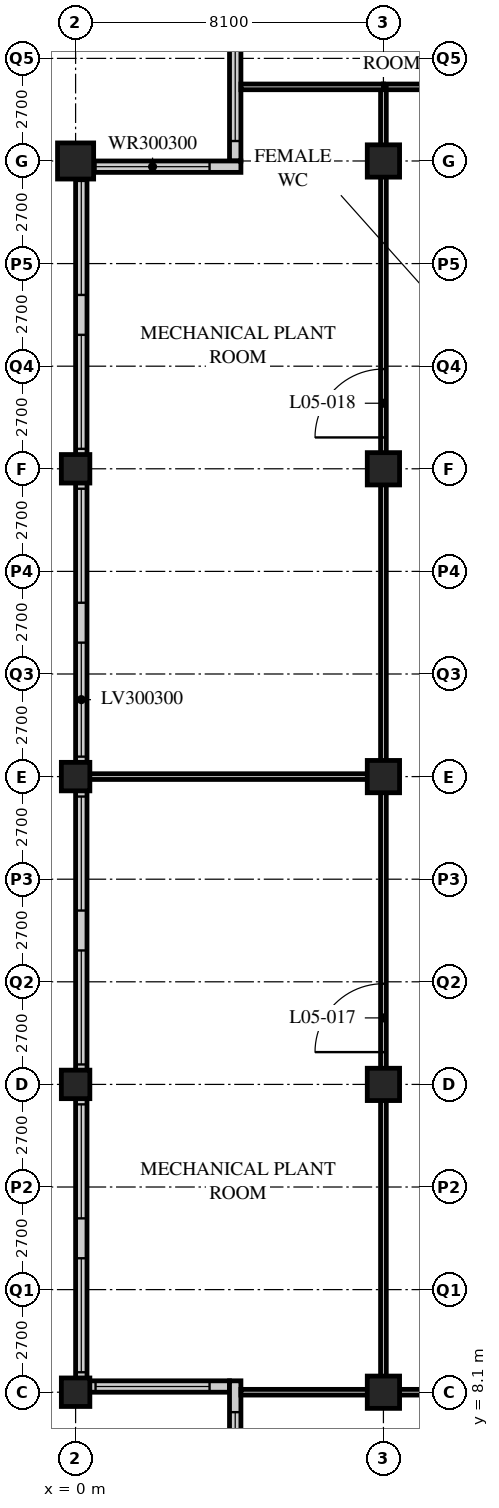
"""IFC4 building model, lengths in metres.
Left out: names, types, materials, properties, quantities, classifications, styles, units other than length and angle.
Written with IfcOpenShell. Run it as: python <this file> out.ifc"""

import sys

from ifc_helpers import new_model, si_unit, direction, frame, frame_2d, origin, origin_2d, place, context, subcontext, project, spatial, rectangle, hollow_rectangle, extrude, element, fill, save


model = new_model("IFC4")
c1 = context("Model", 3, precision=1e-05, world=origin(), true_north=direction((0.0, 1.0)))
c2 = subcontext(c1, "Body", "Model", "MODEL_VIEW")
j1 = project(units=[si_unit("LENGTHUNIT", "METRE"), si_unit("PLANEANGLEUNIT", "RADIAN")], contexts=[c1])
p1 = place(None, origin())
s1 = spatial("IfcSite", under=j1, at=p1, CompositionType="ELEMENT")
p2 = place(p1, origin())
s2 = spatial("IfcBuilding", under=s1, at=p2, CompositionType="ELEMENT")
p3 = place(p2, frame((0.0, 0.0, 27.6)))
s3 = spatial("IfcBuildingStorey", under=s2, at=p3, CompositionType="ELEMENT", Elevation=27.6)
for number, where, z_axis, x_axis in (
    (1, (0.0, 8.1, 0.0), (0.0, 0.0, 1.0), (1.0, 0.0, 0.0)),
    (2, (0.0, 16.2, 0.0), (0.0, 0.0, 1.0), (1.0, 0.0, 0.0)),
    (3, (0.0, 24.3, 0.0), (0.0, 0.0, 1.0), (1.0, 0.0, 0.0)),
    (4, (0.0, 32.4, 0.0), (0.0, 0.0, 1.0), (1.0, 0.0, 0.0)),
):
    element("IfcColumn", number, at=place(p3, frame(where, z_axis=z_axis, x_axis=x_axis)), inside=s3, PredefinedType="COLUMN", context=c2, shape_type="SweptSolid", body=[
        extrude(hollow_rectangle(XDim=0.75, YDim=0.75, WallThickness=0.07, at=origin_2d()), origin(), (0.0, 0.0, 1.0), 5.4),
    ])
p4 = place(p3, frame((0.0, 40.5, 0.0), z_axis=(0.0, 0.0, 1.0), x_axis=(1.0, 0.0, 0.0)))
e5 = element("IfcColumn", 5, at=p4, inside=s3, PredefinedType="COLUMN", context=c2, shape_type="SweptSolid", body=[
    extrude(hollow_rectangle(XDim=0.95, YDim=0.95, WallThickness=0.1, at=origin_2d()), origin(), (0.0, 0.0, 1.0), 5.4),
])
for number, where, z_axis, x_axis in (
    (6, (8.1, 8.1, 0.0), (0.0, 0.0, 1.0), (1.0, 0.0, 0.0)),
    (7, (8.1, 16.2, 0.0), (0.0, 0.0, 1.0), (1.0, 0.0, 0.0)),
    (8, (8.1, 24.3, 0.0), (0.0, 0.0, 1.0), (1.0, 0.0, 0.0)),
    (9, (8.1, 32.4, 0.0), (0.0, 0.0, 1.0), (1.0, 0.0, 0.0)),
    (10, (8.1, 40.5, 0.0), (0.0, 0.0, 1.0), (1.0, 0.0, 0.0)),
):
    element("IfcColumn", number, at=place(p3, frame(where, z_axis=z_axis, x_axis=x_axis)), inside=s3, PredefinedType="COLUMN", context=c2, shape_type="SweptSolid", body=[
        extrude(hollow_rectangle(XDim=0.85, YDim=0.85, WallThickness=0.085, at=origin_2d()), origin(), (0.0, 0.0, 1.0), 5.4),
    ])
p5 = place(p3, frame((4.2, 44.25, 0.0), z_axis=(0.0, 0.0, 1.0), x_axis=(0.0, -1.0, 0.0)))
e11 = element("IfcWall", 11, at=p5, inside=s3, PredefinedType="SOLIDWALL", context=c2, shape_type="SweptSolid", body=[
    extrude(rectangle(XDim=3.75, YDim=0.3, at=frame_2d((1.875, 0.0))), origin(), (0.0, 0.0, 1.0), 5.19),
])
p6 = place(p5, frame((0.225, 0.0, 0.9)))
e12 = element("IfcOpeningElement", 12, at=p6, cuts=e11, PredefinedType="OPENING", context=c2, shape_type="SweptSolid", body=[
    extrude(rectangle(XDim=3.0, YDim=3.0, at=frame_2d((1.5, 1.5))), frame((0.0, 0.16, 0.0), z_axis=(0.0, -1.0, 0.0), x_axis=(1.0, 0.0, 0.0)), (0.0, 0.0, 1.0), 0.32),
])
p7 = place(p3, frame((4.35, 40.35, 0.0), z_axis=(0.0, 0.0, 1.0), x_axis=(-1.0, 0.0, 0.0)))
e13 = element("IfcWall", 13, at=p7, inside=s3, PredefinedType="SOLIDWALL", context=c2, shape_type="SweptSolid", body=[
    extrude(rectangle(XDim=4.35, YDim=0.3, at=frame_2d((2.175, 0.0))), origin(), (0.0, 0.0, 1.0), 5.19),
])
p8 = place(p7, frame((0.825, 0.0, 0.9)))
e14 = element("IfcOpeningElement", 14, at=p8, cuts=e13, PredefinedType="OPENING", context=c2, shape_type="SweptSolid", body=[
    extrude(rectangle(XDim=3.0, YDim=3.0, at=frame_2d((1.5, 1.5))), frame((0.0, 0.16, 0.0), z_axis=(0.0, -1.0, 0.0), x_axis=(1.0, 0.0, 0.0)), (0.0, 0.0, 1.0), 0.32),
])
p9 = place(p3, frame((0.15, 40.2, 0.0), z_axis=(0.0, 0.0, 1.0), x_axis=(0.0, -1.0, 0.0)))
e15 = element("IfcWall", 15, at=p9, inside=s3, PredefinedType="SOLIDWALL", context=c2, shape_type="SweptSolid", body=[
    extrude(rectangle(XDim=32.1, YDim=0.3, at=frame_2d((16.05, 0.0))), origin(), (0.0, 0.0, 1.0), 5.19),
])
p10 = place(p9, frame((0.225, 0.0, 0.9)))
e16 = element("IfcOpeningElement", 16, at=p10, cuts=e15, PredefinedType="OPENING", context=c2, shape_type="SweptSolid", body=[
    extrude(rectangle(XDim=3.0, YDim=3.0, at=frame_2d((1.5, 1.5))), frame((0.0, 0.16, 0.0), z_axis=(0.0, -1.0, 0.0), x_axis=(1.0, 0.0, 0.0)), (0.0, 0.0, 1.0), 0.32),
])
p11 = place(p9, frame((4.275, 0.0, 0.9)))
e17 = element("IfcOpeningElement", 17, at=p11, cuts=e15, PredefinedType="OPENING", context=c2, shape_type="SweptSolid", body=[
    extrude(rectangle(XDim=3.0, YDim=3.0, at=frame_2d((1.5, 1.5))), frame((0.0, 0.16, 0.0), z_axis=(0.0, -1.0, 0.0), x_axis=(1.0, 0.0, 0.0)), (0.0, 0.0, 1.0), 0.32),
])
p12 = place(p9, frame((8.325, 0.0, 0.9)))
e18 = element("IfcOpeningElement", 18, at=p12, cuts=e15, PredefinedType="OPENING", context=c2, shape_type="SweptSolid", body=[
    extrude(rectangle(XDim=3.0, YDim=3.0, at=frame_2d((1.5, 1.5))), frame((0.0, 0.16, 0.0), z_axis=(0.0, -1.0, 0.0), x_axis=(1.0, 0.0, 0.0)), (0.0, 0.0, 1.0), 0.32),
])
p13 = place(p9, frame((12.375, 0.0, 0.9)))
e19 = element("IfcOpeningElement", 19, at=p13, cuts=e15, PredefinedType="OPENING", context=c2, shape_type="SweptSolid", body=[
    extrude(rectangle(XDim=3.0, YDim=3.0, at=frame_2d((1.5, 1.5))), frame((0.0, 0.16, 0.0), z_axis=(0.0, -1.0, 0.0), x_axis=(1.0, 0.0, 0.0)), (0.0, 0.0, 1.0), 0.32),
])
p14 = place(p9, frame((16.425, 0.0, 0.9)))
e20 = element("IfcOpeningElement", 20, at=p14, cuts=e15, PredefinedType="OPENING", context=c2, shape_type="SweptSolid", body=[
    extrude(rectangle(XDim=3.0, YDim=3.0, at=frame_2d((1.5, 1.5))), frame((0.0, 0.16, 0.0), z_axis=(0.0, -1.0, 0.0), x_axis=(1.0, 0.0, 0.0)), (0.0, 0.0, 1.0), 0.32),
])
p15 = place(p9, frame((20.475, 0.0, 0.9)))
e21 = element("IfcOpeningElement", 21, at=p15, cuts=e15, PredefinedType="OPENING", context=c2, shape_type="SweptSolid", body=[
    extrude(rectangle(XDim=3.0, YDim=3.0, at=frame_2d((1.5, 1.5))), frame((0.0, 0.16, 0.0), z_axis=(0.0, -1.0, 0.0), x_axis=(1.0, 0.0, 0.0)), (0.0, 0.0, 1.0), 0.32),
])
p16 = place(p9, frame((24.525, 0.0, 0.9)))
e22 = element("IfcOpeningElement", 22, at=p16, cuts=e15, PredefinedType="OPENING", context=c2, shape_type="SweptSolid", body=[
    extrude(rectangle(XDim=3.0, YDim=3.0, at=frame_2d((1.5, 1.5))), frame((0.0, 0.16, 0.0), z_axis=(0.0, -1.0, 0.0), x_axis=(1.0, 0.0, 0.0)), (0.0, 0.0, 1.0), 0.32),
])
p17 = place(p9, frame((28.575, 0.0, 0.9)))
e23 = element("IfcOpeningElement", 23, at=p17, cuts=e15, PredefinedType="OPENING", context=c2, shape_type="SweptSolid", body=[
    extrude(rectangle(XDim=3.0, YDim=3.0, at=frame_2d((1.5, 1.5))), frame((0.0, 0.16, 0.0), z_axis=(0.0, -1.0, 0.0), x_axis=(1.0, 0.0, 0.0)), (0.0, 0.0, 1.0), 0.32),
])
p18 = place(p3, frame((0.3, 8.25, 0.0), z_axis=(0.0, 0.0, 1.0), x_axis=(1.0, 0.0, 0.0)))
e24 = element("IfcWall", 24, at=p18, inside=s3, PredefinedType="SOLIDWALL", context=c2, shape_type="SweptSolid", body=[
    extrude(rectangle(XDim=3.75, YDim=0.3, at=frame_2d((1.875, 0.0))), origin(), (0.0, 0.0, 1.0), 5.19),
])
p19 = place(p18, frame((0.225, 0.0, 0.9)))
e25 = element("IfcOpeningElement", 25, at=p19, cuts=e24, PredefinedType="OPENING", context=c2, shape_type="SweptSolid", body=[
    extrude(rectangle(XDim=3.0, YDim=3.0, at=frame_2d((1.5, 1.5))), frame((0.0, 0.16, 0.0), z_axis=(0.0, -1.0, 0.0), x_axis=(1.0, 0.0, 0.0)), (0.0, 0.0, 1.0), 0.32),
])
p20 = place(p3, frame((4.2, 8.4, 0.0), z_axis=(0.0, 0.0, 1.0), x_axis=(0.0, -1.0, 0.0)))
e26 = element("IfcWall", 26, at=p20, inside=s3, PredefinedType="SOLIDWALL", context=c2, shape_type="SweptSolid", body=[
    extrude(rectangle(XDim=4.35, YDim=0.3, at=frame_2d((2.175, 0.0))), origin(), (0.0, 0.0, 1.0), 5.19),
])
p21 = place(p20, frame((0.825, 0.0, 0.9)))
e27 = element("IfcOpeningElement", 27, at=p21, cuts=e26, PredefinedType="OPENING", context=c2, shape_type="SweptSolid", body=[
    extrude(rectangle(XDim=3.0, YDim=3.0, at=frame_2d((1.5, 1.5))), frame((0.0, 0.16, 0.0), z_axis=(0.0, -1.0, 0.0), x_axis=(1.0, 0.0, 0.0)), (0.0, 0.0, 1.0), 0.32),
])
p22 = place(p3, frame((8.1, 8.1, 0.0), z_axis=(0.0, 0.0, 1.0), x_axis=(1.0, 0.0, 0.0)))
e28 = element("IfcWall", 28, at=p22, inside=s3, PredefinedType="PARTITIONING", context=c2, shape_type="SweptSolid", body=[
    extrude(rectangle(XDim=40.5, YDim=0.15, at=frame_2d((20.25, 0.0))), origin(), (0.0, 0.0, 1.0), 4.578),
])
p23 = place(p22, frame((11.25, 0.0, 0.0)))
e29 = element("IfcOpeningElement", 29, at=p23, cuts=e28, PredefinedType="OPENING", context=c2, shape_type="SweptSolid", body=[
    extrude(rectangle(XDim=1.8, YDim=2.4, at=frame_2d((0.9, 1.2))), frame((0.0, 0.085, 0.0), z_axis=(0.0, -1.0, 0.0), x_axis=(1.0, 0.0, 0.0)), (0.0, 0.0, 1.0), 0.17),
])
p24 = place(p22, frame((27.45, 0.0, 0.0)))
e30 = element("IfcOpeningElement", 30, at=p24, cuts=e28, PredefinedType="OPENING", context=c2, shape_type="SweptSolid", body=[
    extrude(rectangle(XDim=1.8, YDim=2.4, at=frame_2d((0.9, 1.2))), frame((0.0, 0.085, 0.0), z_axis=(0.0, -1.0, 0.0), x_axis=(1.0, 0.0, 0.0)), (0.0, 0.0, 1.0), 0.17),
])
p25 = place(p22, frame((1.525, 0.0, 0.0)))
e31 = element("IfcOpeningElement", 31, at=p25, cuts=e28, PredefinedType="OPENING", context=c2, shape_type="SweptSolid", body=[
    extrude(rectangle(XDim=1.0, YDim=2.1, at=frame_2d((0.5, 1.05))), frame((0.0, 0.085, 0.0), z_axis=(0.0, -1.0, 0.0), x_axis=(1.0, 0.0, 0.0)), (0.0, 0.0, 1.0), 0.17),
])
p26 = place(p22, frame((37.975, 0.0, 0.0)))
e32 = element("IfcOpeningElement", 32, at=p26, cuts=e28, PredefinedType="OPENING", context=c2, shape_type="SweptSolid", body=[
    extrude(rectangle(XDim=1.0, YDim=2.1, at=frame_2d((0.5, 1.05))), frame((0.0, 0.085, 0.0), z_axis=(0.0, -1.0, 0.0), x_axis=(1.0, 0.0, 0.0)), (0.0, 0.0, 1.0), 0.17),
])
p27 = place(p3, frame((8.1, 42.45, 0.0), z_axis=(0.0, 0.0, 1.0), x_axis=(1.0, 0.0, 0.0)))
e33 = element("IfcWall", 33, at=p27, inside=s3, PredefinedType="PARTITIONING", context=c2, shape_type="SweptSolid", body=[
    extrude(rectangle(XDim=40.5, YDim=0.15, at=frame_2d((20.25, 0.0))), origin(), (0.0, 0.0, 1.0), 5.19),
])
p28 = place(p27, frame((8.2, 0.0, 0.0)))
e34 = element("IfcOpeningElement", 34, at=p28, cuts=e33, PredefinedType="OPENING", context=c2, shape_type="SweptSolid", body=[
    extrude(rectangle(XDim=1.8, YDim=2.4, at=frame_2d((0.9, 1.2))), frame((0.0, 0.085, 0.0), z_axis=(0.0, -1.0, 0.0), x_axis=(1.0, 0.0, 0.0)), (0.0, 0.0, 1.0), 0.17),
])
p29 = place(p27, frame((19.35, 0.0, 0.0)))
e35 = element("IfcOpeningElement", 35, at=p29, cuts=e33, PredefinedType="OPENING", context=c2, shape_type="SweptSolid", body=[
    extrude(rectangle(XDim=1.8, YDim=2.4, at=frame_2d((0.9, 1.2))), frame((0.0, 0.085, 0.0), z_axis=(0.0, -1.0, 0.0), x_axis=(1.0, 0.0, 0.0)), (0.0, 0.0, 1.0), 0.17),
])
p30 = place(p27, frame((32.5, 0.0, 0.0)))
e36 = element("IfcOpeningElement", 36, at=p30, cuts=e33, PredefinedType="OPENING", context=c2, shape_type="SweptSolid", body=[
    extrude(rectangle(XDim=1.8, YDim=2.4, at=frame_2d((0.9, 1.2))), frame((0.0, 0.085, 0.0), z_axis=(0.0, -1.0, 0.0), x_axis=(1.0, 0.0, 0.0)), (0.0, 0.0, 1.0), 0.17),
])
p31 = place(p27, frame((37.975, 0.0, 0.0)))
e37 = element("IfcOpeningElement", 37, at=p31, cuts=e33, PredefinedType="OPENING", context=c2, shape_type="SweptSolid", body=[
    extrude(rectangle(XDim=1.0, YDim=2.1, at=frame_2d((0.5, 1.05))), frame((0.0, 0.085, 0.0), z_axis=(0.0, -1.0, 0.0), x_axis=(1.0, 0.0, 0.0)), (0.0, 0.0, 1.0), 0.17),
])
p32 = place(p27, frame((1.525, 0.0, 0.0)))
e38 = element("IfcOpeningElement", 38, at=p32, cuts=e33, PredefinedType="OPENING", context=c2, shape_type="SweptSolid", body=[
    extrude(rectangle(XDim=1.0, YDim=2.1, at=frame_2d((0.5, 1.05))), frame((0.0, 0.085, 0.0), z_axis=(0.0, -1.0, 0.0), x_axis=(1.0, 0.0, 0.0)), (0.0, 0.0, 1.0), 0.17),
])
p33 = place(p3, frame((8.1, 8.1, 0.0), z_axis=(0.0, 0.0, 1.0), x_axis=(0.0, 1.0, 0.0)))
e39 = element("IfcWall", 39, at=p33, inside=s3, PredefinedType="PARTITIONING", context=c2, shape_type="SweptSolid", body=[
    extrude(rectangle(XDim=34.35, YDim=0.15, at=frame_2d((17.175, 0.0))), origin(), (0.0, 0.0, 1.0), 4.578),
])
p34 = place(p33, frame((8.95, 0.0, 0.0)))
e40 = element("IfcOpeningElement", 40, at=p34, cuts=e39, PredefinedType="OPENING", context=c2, shape_type="SweptSolid", body=[
    extrude(rectangle(XDim=1.8, YDim=2.4, at=frame_2d((0.9, 1.2))), frame((0.0, 0.085, 0.0), z_axis=(0.0, -1.0, 0.0), x_axis=(1.0, 0.0, 0.0)), (0.0, 0.0, 1.0), 0.17),
])
p35 = place(p33, frame((25.125, 0.0, 0.0)))
e41 = element("IfcOpeningElement", 41, at=p35, cuts=e39, PredefinedType="OPENING", context=c2, shape_type="SweptSolid", body=[
    extrude(rectangle(XDim=1.8, YDim=2.4, at=frame_2d((0.9, 1.2))), frame((0.0, 0.085, 0.0), z_axis=(0.0, -1.0, 0.0), x_axis=(1.0, 0.0, 0.0)), (0.0, 0.0, 1.0), 0.17),
])
p36 = place(p3, frame((8.1, 24.3, 0.0), z_axis=(0.0, 0.0, 1.0), x_axis=(-1.0, 0.0, 0.0)))
e42 = element("IfcWall", 42, at=p36, inside=s3, PredefinedType="PARTITIONING", context=c2, shape_type="SweptSolid", body=[
    extrude(rectangle(XDim=7.8, YDim=0.15, at=frame_2d((3.9, 0.0))), origin(), (0.0, 0.0, 1.0), 4.578),
])
p37 = place(p3, frame((4.35, 8.1, 0.0), z_axis=(0.0, 0.0, 1.0), x_axis=(1.0, 0.0, 0.0)))
e43 = element("IfcWall", 43, at=p37, inside=s3, PredefinedType="PARTITIONING", context=c2, shape_type="SweptSolid", body=[
    extrude(rectangle(XDim=3.75, YDim=0.15, at=frame_2d((1.875, 0.0))), origin(), (0.0, 0.0, 1.0), 4.578),
])
p38 = place(p3, frame((4.35, 42.45, 0.0), z_axis=(0.0, 0.0, 1.0), x_axis=(1.0, 0.0, 0.0)))
e44 = element("IfcWall", 44, at=p38, inside=s3, PredefinedType="PARTITIONING", context=c2, shape_type="SweptSolid", body=[
    extrude(rectangle(XDim=3.75, YDim=0.15, at=frame_2d((1.875, 0.0))), origin(), (0.0, 0.0, 1.0), 5.19),
])
p39 = place(p6, origin())
e45 = element("IfcWindow", 45, at=p39, inside=s3, PartitioningType="SINGLE_PANEL", PredefinedType="WINDOW", context=c2, shape_type="SweptSolid", body=[
    extrude(rectangle(XDim=3.0, YDim=3.0, at=frame_2d((1.5, 1.5))), frame((0.0, 0.03, 0.0), z_axis=(0.0, -1.0, 0.0), x_axis=(1.0, 0.0, 0.0)), (0.0, 0.0, 1.0), 0.06),
])
fill(e12, e45)
p40 = place(p8, origin())
e46 = element("IfcWindow", 46, at=p40, inside=s3, PartitioningType="SINGLE_PANEL", PredefinedType="WINDOW", context=c2, shape_type="SweptSolid", body=[
    extrude(rectangle(XDim=3.0, YDim=3.0, at=frame_2d((1.5, 1.5))), frame((0.0, 0.03, 0.0), z_axis=(0.0, -1.0, 0.0), x_axis=(1.0, 0.0, 0.0)), (0.0, 0.0, 1.0), 0.06),
])
fill(e14, e46)
p41 = place(p10, origin())
e47 = element("IfcWindow", 47, at=p41, inside=s3, PartitioningType="SINGLE_PANEL", PredefinedType="USERDEFINED", context=c2, shape_type="SweptSolid", body=[
    extrude(rectangle(XDim=3.0, YDim=3.0, at=frame_2d((1.5, 1.5))), frame((0.0, 0.075, 0.0), z_axis=(0.0, -1.0, 0.0), x_axis=(1.0, 0.0, 0.0)), (0.0, 0.0, 1.0), 0.15),
])
fill(e16, e47)
p42 = place(p11, origin())
e48 = element("IfcWindow", 48, at=p42, inside=s3, PartitioningType="SINGLE_PANEL", PredefinedType="USERDEFINED", context=c2, shape_type="SweptSolid", body=[
    extrude(rectangle(XDim=3.0, YDim=3.0, at=frame_2d((1.5, 1.5))), frame((0.0, 0.075, 0.0), z_axis=(0.0, -1.0, 0.0), x_axis=(1.0, 0.0, 0.0)), (0.0, 0.0, 1.0), 0.15),
])
fill(e17, e48)
p43 = place(p12, origin())
e49 = element("IfcWindow", 49, at=p43, inside=s3, PartitioningType="SINGLE_PANEL", PredefinedType="USERDEFINED", context=c2, shape_type="SweptSolid", body=[
    extrude(rectangle(XDim=3.0, YDim=3.0, at=frame_2d((1.5, 1.5))), frame((0.0, 0.075, 0.0), z_axis=(0.0, -1.0, 0.0), x_axis=(1.0, 0.0, 0.0)), (0.0, 0.0, 1.0), 0.15),
])
fill(e18, e49)
p44 = place(p13, origin())
e50 = element("IfcWindow", 50, at=p44, inside=s3, PartitioningType="SINGLE_PANEL", PredefinedType="USERDEFINED", context=c2, shape_type="SweptSolid", body=[
    extrude(rectangle(XDim=3.0, YDim=3.0, at=frame_2d((1.5, 1.5))), frame((0.0, 0.075, 0.0), z_axis=(0.0, -1.0, 0.0), x_axis=(1.0, 0.0, 0.0)), (0.0, 0.0, 1.0), 0.15),
])
fill(e19, e50)
p45 = place(p14, origin())
e51 = element("IfcWindow", 51, at=p45, inside=s3, PartitioningType="SINGLE_PANEL", PredefinedType="USERDEFINED", context=c2, shape_type="SweptSolid", body=[
    extrude(rectangle(XDim=3.0, YDim=3.0, at=frame_2d((1.5, 1.5))), frame((0.0, 0.075, 0.0), z_axis=(0.0, -1.0, 0.0), x_axis=(1.0, 0.0, 0.0)), (0.0, 0.0, 1.0), 0.15),
])
fill(e20, e51)
p46 = place(p15, origin())
e52 = element("IfcWindow", 52, at=p46, inside=s3, PartitioningType="SINGLE_PANEL", PredefinedType="USERDEFINED", context=c2, shape_type="SweptSolid", body=[
    extrude(rectangle(XDim=3.0, YDim=3.0, at=frame_2d((1.5, 1.5))), frame((0.0, 0.075, 0.0), z_axis=(0.0, -1.0, 0.0), x_axis=(1.0, 0.0, 0.0)), (0.0, 0.0, 1.0), 0.15),
])
fill(e21, e52)
p47 = place(p16, origin())
e53 = element("IfcWindow", 53, at=p47, inside=s3, PartitioningType="SINGLE_PANEL", PredefinedType="USERDEFINED", context=c2, shape_type="SweptSolid", body=[
    extrude(rectangle(XDim=3.0, YDim=3.0, at=frame_2d((1.5, 1.5))), frame((0.0, 0.075, 0.0), z_axis=(0.0, -1.0, 0.0), x_axis=(1.0, 0.0, 0.0)), (0.0, 0.0, 1.0), 0.15),
])
fill(e22, e53)
p48 = place(p17, origin())
e54 = element("IfcWindow", 54, at=p48, inside=s3, PartitioningType="SINGLE_PANEL", PredefinedType="USERDEFINED", context=c2, shape_type="SweptSolid", body=[
    extrude(rectangle(XDim=3.0, YDim=3.0, at=frame_2d((1.5, 1.5))), frame((0.0, 0.075, 0.0), z_axis=(0.0, -1.0, 0.0), x_axis=(1.0, 0.0, 0.0)), (0.0, 0.0, 1.0), 0.15),
])
fill(e23, e54)
p49 = place(p19, origin())
e55 = element("IfcWindow", 55, at=p49, inside=s3, PartitioningType="SINGLE_PANEL", PredefinedType="WINDOW", context=c2, shape_type="SweptSolid", body=[
    extrude(rectangle(XDim=3.0, YDim=3.0, at=frame_2d((1.5, 1.5))), frame((0.0, 0.03, 0.0), z_axis=(0.0, -1.0, 0.0), x_axis=(1.0, 0.0, 0.0)), (0.0, 0.0, 1.0), 0.06),
])
fill(e25, e55)
p50 = place(p21, origin())
e56 = element("IfcWindow", 56, at=p50, inside=s3, PartitioningType="SINGLE_PANEL", PredefinedType="WINDOW", context=c2, shape_type="SweptSolid", body=[
    extrude(rectangle(XDim=3.0, YDim=3.0, at=frame_2d((1.5, 1.5))), frame((0.0, 0.03, 0.0), z_axis=(0.0, -1.0, 0.0), x_axis=(1.0, 0.0, 0.0)), (0.0, 0.0, 1.0), 0.06),
])
fill(e27, e56)
p51 = place(p34, origin())
e57 = element("IfcDoor", 57, at=p51, inside=s3, OperationType="DOUBLE_DOOR_SINGLE_SWING", PredefinedType="DOOR", context=c2, shape_type="SweptSolid", body=[
    extrude(rectangle(XDim=1.8, YDim=2.4, at=frame_2d((0.9, 1.2))), frame((0.0, 0.025, 0.0), z_axis=(0.0, -1.0, 0.0), x_axis=(1.0, 0.0, 0.0)), (0.0, 0.0, 1.0), 0.05),
])
fill(e40, e57)
p52 = place(p35, origin())
e58 = element("IfcDoor", 58, at=p52, inside=s3, OperationType="DOUBLE_DOOR_SINGLE_SWING", PredefinedType="DOOR", context=c2, shape_type="SweptSolid", body=[
    extrude(rectangle(XDim=1.8, YDim=2.4, at=frame_2d((0.9, 1.2))), frame((0.0, 0.025, 0.0), z_axis=(0.0, -1.0, 0.0), x_axis=(1.0, 0.0, 0.0)), (0.0, 0.0, 1.0), 0.05),
])
fill(e41, e58)
save(model, sys.argv[1])
